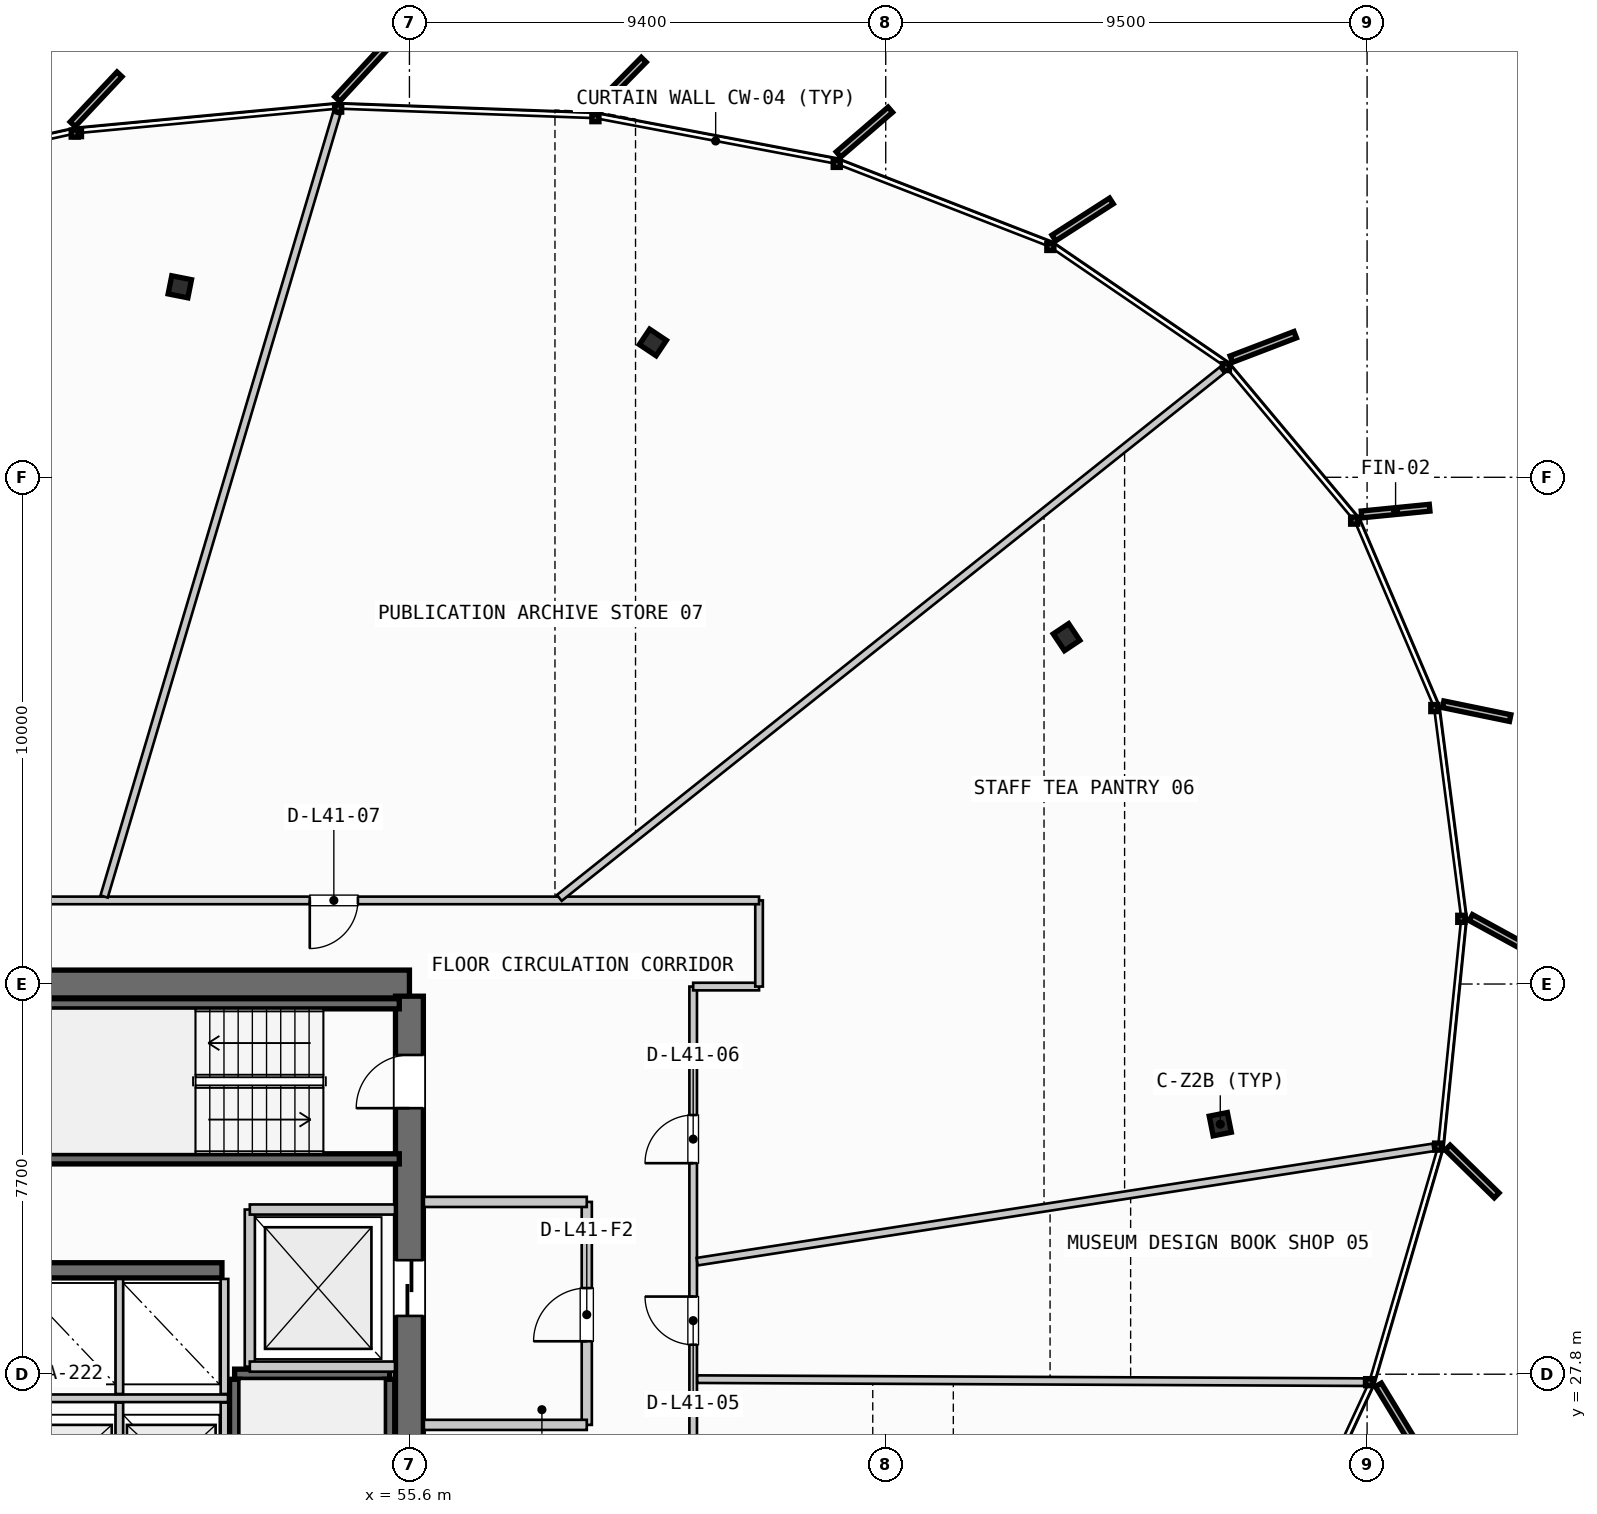
"""IFC4 building model, lengths in metres.
Left out: names, types, materials, properties, quantities, classifications, styles, units other than length and angle.
Written with IfcOpenShell. Run it as: python <this file> out.ifc"""

import sys

from ifc_helpers import new_model, si_unit, direction, frame, frame_2d, origin, origin_2d, place, context, subcontext, project, spatial, rectangle, i_section, extrude, source, transform, mapped, element, fill, save


model = new_model("IFC4")
c1 = context("Model", 3, precision=1e-05, world=origin(), true_north=direction((0.0, 1.0)))
c2 = subcontext(c1, "Body", "Model", "MODEL_VIEW")
j1 = project(units=[si_unit("LENGTHUNIT", "METRE"), si_unit("PLANEANGLEUNIT", "RADIAN")], contexts=[c1])
p1 = place(None, origin())
s1 = spatial("IfcSite", under=j1, at=p1, CompositionType="ELEMENT")
p2 = place(p1, origin())
s2 = spatial("IfcBuilding", under=s1, at=p2, CompositionType="ELEMENT")
p3 = place(p2, frame((0.0, 0.0, 160.75)))
s3 = spatial("IfcBuildingStorey", under=s2, at=p3, CompositionType="ELEMENT", Elevation=160.75)
p4 = place(p3, frame((55.6, 35.5, 0.0), z_axis=(0.0, 0.0, 1.0), x_axis=(-1.0, 0.0, 0.0)))
e1 = element("IfcWall", 1, at=p4, inside=s3, PredefinedType="SHEAR", context=c2, shape_type="SweptSolid", body=[
    extrude(rectangle(XDim=17.6, YDim=0.55, at=frame_2d((8.8, 0.0))), origin(), (0.0, 0.0, 1.0), 3.3),
])
p5 = place(p4, frame((8.05, 0.0, 0.0)))
e2 = element("IfcOpeningElement", 2, at=p5, cuts=e1, PredefinedType="OPENING", context=c2, shape_type="SweptSolid", body=[
    extrude(rectangle(XDim=1.5, YDim=2.2, at=frame_2d((0.75, 1.1))), frame((0.0, 0.285, 0.0), z_axis=(0.0, -1.0, 0.0), x_axis=(1.0, 0.0, 0.0)), (0.0, 0.0, 1.0), 0.57),
])
p6 = place(p4, frame((14.95, 0.0, 0.0)))
e3 = element("IfcOpeningElement", 3, at=p6, cuts=e1, PredefinedType="OPENING", context=c2, shape_type="SweptSolid", body=[
    extrude(rectangle(XDim=1.4, YDim=2.3, at=frame_2d((0.7, 1.15))), frame((0.0, 0.285, 0.0), z_axis=(0.0, -1.0, 0.0), x_axis=(1.0, 0.0, 0.0)), (0.0, 0.0, 1.0), 0.57),
])
p7 = place(p4, frame((12.6, 0.0, 0.0)))
e4 = element("IfcOpeningElement", 4, at=p7, cuts=e1, PredefinedType="OPENING", context=c2, shape_type="SweptSolid", body=[
    extrude(rectangle(XDim=0.95, YDim=2.15, at=frame_2d((0.475, 1.075))), frame((0.0, 0.285, 0.0), z_axis=(0.0, -1.0, 0.0), x_axis=(1.0, 0.0, 0.0)), (0.0, 0.0, 1.0), 0.57),
])
p8 = place(p4, frame((10.45, 0.0, 0.0)))
e5 = element("IfcOpeningElement", 5, at=p8, cuts=e1, PredefinedType="OPENING", context=c2, shape_type="SweptSolid", body=[
    extrude(rectangle(XDim=0.95, YDim=2.15, at=frame_2d((0.475, 1.075))), frame((0.0, 0.285, 0.0), z_axis=(0.0, -1.0, 0.0), x_axis=(1.0, 0.0, 0.0)), (0.0, 0.0, 1.0), 0.57),
])
p9 = place(p3, frame((55.6, 20.34, 0.0), z_axis=(0.0, 0.0, 1.0), x_axis=(0.0, 1.0, 0.0)))
e6 = element("IfcWall", 6, at=p9, inside=s3, PredefinedType="SHEAR", context=c2, shape_type="SweptSolid", body=[
    extrude(rectangle(XDim=14.92, YDim=0.55, at=frame_2d((7.46, 0.0))), origin(), (0.0, 0.0, 1.0), 3.3),
])
p10 = place(p9, frame((12.71, 0.0, 0.0)))
e7 = element("IfcOpeningElement", 7, at=p10, cuts=e6, PredefinedType="OPENING", context=c2, shape_type="SweptSolid", body=[
    extrude(rectangle(XDim=1.05, YDim=2.15, at=frame_2d((0.525, 1.075))), frame((0.0, 0.285, 0.0), z_axis=(0.0, -1.0, 0.0), x_axis=(1.0, 0.0, 0.0)), (0.0, 0.0, 1.0), 0.57),
])
p11 = place(p9, frame((8.61, 0.0, 0.0)))
e8 = element("IfcOpeningElement", 8, at=p11, cuts=e6, PredefinedType="OPENING", context=c2, shape_type="SweptSolid", body=[
    extrude(rectangle(XDim=1.1, YDim=2.2, at=frame_2d((0.55, 1.1))), frame((0.0, 0.285, 0.0), z_axis=(0.0, -1.0, 0.0), x_axis=(1.0, 0.0, 0.0)), (0.0, 0.0, 1.0), 0.57),
])
p12 = place(p3, frame((47.65, 29.85, 0.0), z_axis=(0.0, 0.0, 1.0), x_axis=(1.0, 0.0, 0.0)))
e9 = element("IfcWall", 9, at=p12, inside=s3, PredefinedType="SHEAR", context=c2, shape_type="SweptSolid", body=[
    extrude(rectangle(XDim=4.25, YDim=0.3, at=frame_2d((2.125, 0.0))), origin(), (0.0, 0.0, 1.0), 3.3),
])
m1 = source(origin(), c2, "Body", "SweptSolid", [
    extrude(i_section(OverallWidth=0.397, OverallDepth=0.365, WebThickness=0.028, FlangeThickness=0.044, FilletRadius=0.015, at=origin_2d()), origin(), (0.0, 0.0, 1.0), 3.3),
])
for number, where, z_axis, x_axis in (
    (10, (71.603, 32.733, 0.0), (0.0, 0.0, 1.0), (0.981, 0.195, 0.0)),
    (11, (68.569, 42.345, 0.0), (0.0, 0.0, 1.0), (0.831, 0.556, 0.0)),
    (12, (60.405, 48.161, 0.0), (0.0, 0.0, 1.0), (0.556, 0.831, 0.0)),
    (13, (51.069, 49.259, 0.0), (0.0, 0.0, 1.0), (0.195, 0.981, 0.0)),
):
    element("IfcColumn", number, at=place(p3, frame(where, z_axis=z_axis, x_axis=x_axis)), inside=s3, PredefinedType="COLUMN", context=c2, shape_type="MappedRepresentation", body=[
        mapped(m1, transform((0.0, 0.0, 0.0), scale=1.0)),
    ])
p13 = place(p3, frame((52.15, 27.8, 0.0), z_axis=(0.0, 0.0, 1.0), x_axis=(1.0, 0.0, 0.0)))
e14 = element("IfcWall", 14, at=p13, inside=s3, PredefinedType="SHEAR", context=c2, shape_type="SweptSolid", body=[
    extrude(rectangle(XDim=3.06, YDim=0.2, at=frame_2d((1.53, 0.0))), origin(), (0.0, 0.0, 1.0), 3.3),
])
for number, where, z_axis, x_axis in (
    (15, (55.21, 27.7, 0.0), (0.0, 0.0, 1.0), (0.0, -1.0, 0.0)),
    (16, (52.15, 20.35, 0.0), (0.0, 0.0, 1.0), (0.0, 1.0, 0.0)),
    (17, (48.05, 35.11, 0.0), (0.0, 0.0, 1.0), (1.0, 0.0, 0.0)),
    (18, (55.4, 32.05, 0.0), (0.0, 0.0, 1.0), (-1.0, 0.0, 0.0)),
):
    element("IfcWall", number, at=place(p3, frame(where, z_axis=z_axis, x_axis=x_axis)), inside=s3, PredefinedType="SHEAR", context=c2, shape_type="SweptSolid", body=[
        extrude(rectangle(XDim=7.35, YDim=0.2, at=frame_2d((3.675, 0.0))), origin(), (0.0, 0.0, 1.0), 3.3),
    ])
p14 = place(p3, frame((52.45, 27.95, 0.0), z_axis=(0.0, 0.0, 1.0), x_axis=(0.0, 1.0, 0.0)))
e19 = element("IfcWall", 19, at=p14, inside=s3, PredefinedType="PARTITIONING", context=c2, shape_type="SweptSolid", body=[
    extrude(rectangle(XDim=3.1, YDim=0.2, at=frame_2d((1.55, 0.0))), origin(), (0.0, 0.0, 1.0), 2.28),
])
for number, where, z_axis, x_axis in (
    (20, (52.45, 27.95, 0.0), (0.0, 0.0, 1.0), (1.0, 0.0, 0.0)),
    (21, (52.45, 31.05, 0.0), (0.0, 0.0, 1.0), (1.0, 0.0, 0.0)),
):
    element("IfcWall", number, at=place(p3, frame(where, z_axis=z_axis, x_axis=x_axis)), inside=s3, PredefinedType="PARTITIONING", context=c2, shape_type="SweptSolid", body=[
        extrude(rectangle(XDim=2.865, YDim=0.2, at=frame_2d((1.433, 0.0))), origin(), (0.0, 0.0, 1.0), 2.28),
    ])
p15 = place(p3, frame((59.1, 26.8, 0.0), z_axis=(0.0, 0.0, 1.0), x_axis=(0.0, 1.0, 0.0)))
e22 = element("IfcWall", 22, at=p15, inside=s3, PredefinedType="PARTITIONING", context=c2, shape_type="SweptSolid", body=[
    extrude(rectangle(XDim=4.4, YDim=0.2, at=frame_2d((2.2, 0.0))), origin(), (0.0, 0.0, 1.0), 2.28),
])
p16 = place(p15, frame((1.65, 0.0, 0.0)))
e23 = element("IfcOpeningElement", 23, at=p16, cuts=e22, PredefinedType="OPENING", context=c2, shape_type="SweptSolid", body=[
    extrude(rectangle(XDim=1.05, YDim=2.15, at=frame_2d((0.525, 1.075))), frame((0.0, 0.11, 0.0), z_axis=(0.0, -1.0, 0.0), x_axis=(1.0, 0.0, 0.0)), (0.0, 0.0, 1.0), 0.22),
])
for number, where, z_axis, x_axis in (
    (24, (55.885, 26.8, 0.0), (0.0, 0.0, 1.0), (1.0, 0.0, 0.0)),
    (25, (55.885, 31.2, 0.0), (0.0, 0.0, 1.0), (1.0, 0.0, 0.0)),
):
    element("IfcWall", number, at=place(p3, frame(where, z_axis=z_axis, x_axis=x_axis)), inside=s3, PredefinedType="PARTITIONING", context=c2, shape_type="SweptSolid", body=[
        extrude(rectangle(XDim=3.215, YDim=0.2, at=frame_2d((1.607, 0.0))), origin(), (0.0, 0.0, 1.0), 2.28),
    ])
p17 = place(p3, frame((47.7, 27.325, 0.0), z_axis=(0.0, 0.0, 1.0), x_axis=(1.0, 0.0, 0.0)))
e26 = element("IfcWall", 26, at=p17, inside=s3, PredefinedType="PARTITIONING", context=c2, shape_type="SweptSolid", body=[
    extrude(rectangle(XDim=4.32, YDim=0.15, at=frame_2d((2.16, 0.0))), origin(), (0.0, 0.0, 1.0), 2.28),
])
for number, where, z_axis, x_axis in (
    (27, (49.875, 24.92, 0.0), (0.0, 0.0, 1.0), (0.0, 1.0, 0.0)),
    (28, (51.95, 24.92, 0.0), (0.0, 0.0, 1.0), (0.0, 1.0, 0.0)),
):
    element("IfcWall", number, at=place(p3, frame(where, z_axis=z_axis, x_axis=x_axis)), inside=s3, PredefinedType="PARTITIONING", context=c2, shape_type="SweptSolid", body=[
        extrude(rectangle(XDim=2.32, YDim=0.15, at=frame_2d((1.16, 0.0))), origin(), (0.0, 0.0, 1.0), 2.28),
    ])
for number, where, z_axis, x_axis in (
    (29, (49.875, 27.41, 0.0), (0.0, 0.0, 1.0), (0.0, 1.0, 0.0)),
    (30, (51.95, 27.41, 0.0), (0.0, 0.0, 1.0), (0.0, 1.0, 0.0)),
):
    element("IfcWall", number, at=place(p3, frame(where, z_axis=z_axis, x_axis=x_axis)), inside=s3, PredefinedType="PARTITIONING", context=c2, shape_type="SweptSolid", body=[
        extrude(rectangle(XDim=2.27, YDim=0.15, at=frame_2d((1.135, 0.0))), origin(), (0.0, 0.0, 1.0), 2.28),
    ])
p18 = place(p3, frame((61.2, 20.15, 0.0), z_axis=(0.0, 0.0, 1.0), x_axis=(0.0, 1.0, 0.0)))
e31 = element("IfcWall", 31, at=p18, inside=s3, PredefinedType="PARTITIONING", context=c2, shape_type="SweptSolid", body=[
    extrude(rectangle(XDim=15.3, YDim=0.15, at=frame_2d((7.65, 0.0))), origin(), (0.0, 0.0, 1.0), 2.28),
])
p19 = place(p18, frame((3.591, 0.0, 0.0)))
e32 = element("IfcOpeningElement", 32, at=p19, cuts=e31, PredefinedType="OPENING", context=c2, shape_type="SweptSolid", body=[
    extrude(rectangle(XDim=0.95, YDim=2.15, at=frame_2d((0.475, 1.075))), frame((0.0, 0.085, 0.0), z_axis=(0.0, -1.0, 0.0), x_axis=(1.0, 0.0, 0.0)), (0.0, 0.0, 1.0), 0.17),
])
p20 = place(p18, frame((8.232, 0.0, 0.0)))
e33 = element("IfcOpeningElement", 33, at=p20, cuts=e31, PredefinedType="OPENING", context=c2, shape_type="SweptSolid", body=[
    extrude(rectangle(XDim=0.95, YDim=2.15, at=frame_2d((0.475, 1.075))), frame((0.0, 0.085, 0.0), z_axis=(0.0, -1.0, 0.0), x_axis=(1.0, 0.0, 0.0)), (0.0, 0.0, 1.0), 0.17),
])
p21 = place(p18, frame((11.814, 0.0, 0.0)))
e34 = element("IfcOpeningElement", 34, at=p21, cuts=e31, PredefinedType="OPENING", context=c2, shape_type="SweptSolid", body=[
    extrude(rectangle(XDim=0.95, YDim=2.15, at=frame_2d((0.475, 1.075))), frame((0.0, 0.085, 0.0), z_axis=(0.0, -1.0, 0.0), x_axis=(1.0, 0.0, 0.0)), (0.0, 0.0, 1.0), 0.17),
])
p22 = place(p3, frame((61.2, 35.45, 0.0), z_axis=(0.0, 0.0, 1.0), x_axis=(1.0, 0.0, 0.0)))
e35 = element("IfcWall", 35, at=p22, inside=s3, PredefinedType="PARTITIONING", context=c2, shape_type="SweptSolid", body=[
    extrude(rectangle(XDim=1.3, YDim=0.15, at=frame_2d((0.65, 0.0))), origin(), (0.0, 0.0, 1.0), 2.28),
])
p23 = place(p3, frame((62.5, 35.45, 0.0), z_axis=(0.0, 0.0, 1.0), x_axis=(0.0, 1.0, 0.0)))
e36 = element("IfcWall", 36, at=p23, inside=s3, PredefinedType="PARTITIONING", context=c2, shape_type="SweptSolid", body=[
    extrude(rectangle(XDim=1.7, YDim=0.15, at=frame_2d((0.85, 0.0))), origin(), (0.0, 0.0, 1.0), 2.28),
])
p24 = place(p3, frame((62.5, 37.15, 0.0), z_axis=(0.0, 0.0, 1.0), x_axis=(-1.0, 0.0, 0.0)))
e37 = element("IfcWall", 37, at=p24, inside=s3, PredefinedType="PARTITIONING", context=c2, shape_type="SweptSolid", body=[
    extrude(rectangle(XDim=31.4, YDim=0.15, at=frame_2d((15.7, 0.0))), origin(), (0.0, 0.0, 1.0), 2.28),
])
p25 = place(p24, frame((7.917, 0.0, 0.0)))
e38 = element("IfcOpeningElement", 38, at=p25, cuts=e37, PredefinedType="OPENING", context=c2, shape_type="SweptSolid", body=[
    extrude(rectangle(XDim=0.95, YDim=2.15, at=frame_2d((0.475, 1.075))), frame((0.0, 0.085, 0.0), z_axis=(0.0, -1.0, 0.0), x_axis=(1.0, 0.0, 0.0)), (0.0, 0.0, 1.0), 0.17),
])
p26 = place(p24, frame((18.354, 0.0, 0.0)))
e39 = element("IfcOpeningElement", 39, at=p26, cuts=e37, PredefinedType="OPENING", context=c2, shape_type="SweptSolid", body=[
    extrude(rectangle(XDim=0.95, YDim=2.15, at=frame_2d((0.475, 1.075))), frame((0.0, 0.085, 0.0), z_axis=(0.0, -1.0, 0.0), x_axis=(1.0, 0.0, 0.0)), (0.0, 0.0, 1.0), 0.17),
])
p27 = place(p3, frame((61.28, 27.702, 0.0), z_axis=(0.0, 0.0, 1.0), x_axis=(0.999989924384, -0.004489001126, 0.0)))
e40 = element("IfcWall", 40, at=p27, inside=s3, PredefinedType="PARTITIONING", context=c2, shape_type="SweptSolid", body=[
    extrude(rectangle(XDim=13.162, YDim=0.15, at=frame_2d((6.581, 0.0))), origin(), (0.0, 0.0, 1.0), 2.28),
])
p28 = place(p3, frame((61.279, 30.021, 0.0), z_axis=(0.0, 0.0, 1.0), x_axis=(0.988161445596, 0.153417591681, 0.0)))
e41 = element("IfcWall", 41, at=p28, inside=s3, PredefinedType="PARTITIONING", context=c2, shape_type="SweptSolid", body=[
    extrude(rectangle(XDim=14.698, YDim=0.15, at=frame_2d((7.349, 0.0))), origin(), (0.0, 0.0, 1.0), 2.28),
])
p29 = place(p3, frame((58.559, 37.2, 0.0), z_axis=(0.0, 0.0, 1.0), x_axis=(0.782274609012, 0.62293373331, 0.0)))
e42 = element("IfcWall", 42, at=p29, inside=s3, PredefinedType="PARTITIONING", context=c2, shape_type="SweptSolid", body=[
    extrude(rectangle(XDim=16.716, YDim=0.15, at=frame_2d((8.358, 0.0))), origin(), (0.0, 0.0, 1.0), 2.28),
])
p30 = place(p3, frame((49.575, 37.227, 0.0), z_axis=(0.0, 0.0, 1.0), x_axis=(0.284737466757, 0.958605536717, 0.0)))
e43 = element("IfcWall", 43, at=p30, inside=s3, PredefinedType="PARTITIONING", context=c2, shape_type="SweptSolid", body=[
    extrude(rectangle(XDim=16.12, YDim=0.15, at=frame_2d((8.06, 0.0))), origin(), (0.0, 0.0, 1.0), 2.28),
])
m2 = source(origin(), c2, "Body", "SweptSolid", [
    extrude(rectangle(XDim=1.05, YDim=2.15, at=frame_2d((0.525, 1.075))), frame((0.0, 0.025, 0.0), z_axis=(0.0, -1.0, 0.0), x_axis=(1.0, 0.0, 0.0)), (0.0, 0.0, 1.0), 0.05),
])
p31 = place(p10, origin())
e44 = element("IfcDoor", 44, at=p31, inside=s3, OperationType="SINGLE_SWING_LEFT", PredefinedType="DOOR", context=c2, shape_type="MappedRepresentation", body=[
    mapped(m2, transform((0.0, 0.0, 0.0), scale=1.0)),
])
fill(e7, e44)
m3 = source(origin(), c2, "Body", "SweptSolid", [
    extrude(rectangle(XDim=1.1, YDim=2.2, at=frame_2d((0.55, 1.1))), frame((0.0, 0.025, 0.0), z_axis=(0.0, -1.0, 0.0), x_axis=(1.0, 0.0, 0.0)), (0.0, 0.0, 1.0), 0.05),
])
p32 = place(p11, origin())
e45 = element("IfcDoor", 45, at=p32, inside=s3, OperationType="SLIDING_TO_RIGHT", PredefinedType="DOOR", context=c2, shape_type="MappedRepresentation", body=[
    mapped(m3, transform((0.0, 0.0, 0.0), scale=1.0)),
])
fill(e8, e45)
p33 = place(p16, origin())
e46 = element("IfcDoor", 46, at=p33, inside=s3, OperationType="SINGLE_SWING_LEFT", PredefinedType="DOOR", context=c2, shape_type="MappedRepresentation", body=[
    mapped(m2, transform((0.0, 0.0, 0.0), scale=1.0)),
])
fill(e23, e46)
m4 = source(origin(), c2, "Body", "SweptSolid", [
    extrude(rectangle(XDim=0.95, YDim=2.15, at=frame_2d((0.475, 1.075))), frame((0.0, 0.025, 0.0), z_axis=(0.0, -1.0, 0.0), x_axis=(1.0, 0.0, 0.0)), (0.0, 0.0, 1.0), 0.05),
])
p34 = place(p20, origin())
e47 = element("IfcDoor", 47, at=p34, inside=s3, OperationType="SINGLE_SWING_RIGHT", PredefinedType="DOOR", context=c2, shape_type="MappedRepresentation", body=[
    mapped(m4, transform((0.0, 0.0, 0.0), scale=1.0)),
])
fill(e33, e47)
p35 = place(p21, origin())
e48 = element("IfcDoor", 48, at=p35, inside=s3, OperationType="SINGLE_SWING_LEFT", PredefinedType="DOOR", context=c2, shape_type="MappedRepresentation", body=[
    mapped(m4, transform((0.0, 0.0, 0.0), scale=1.0)),
])
fill(e34, e48)
p36 = place(p25, origin())
e49 = element("IfcDoor", 49, at=p36, inside=s3, OperationType="SINGLE_SWING_RIGHT", PredefinedType="DOOR", context=c2, shape_type="MappedRepresentation", body=[
    mapped(m4, transform((0.0, 0.0, 0.0), scale=1.0)),
])
fill(e38, e49)
save(model, sys.argv[1])
